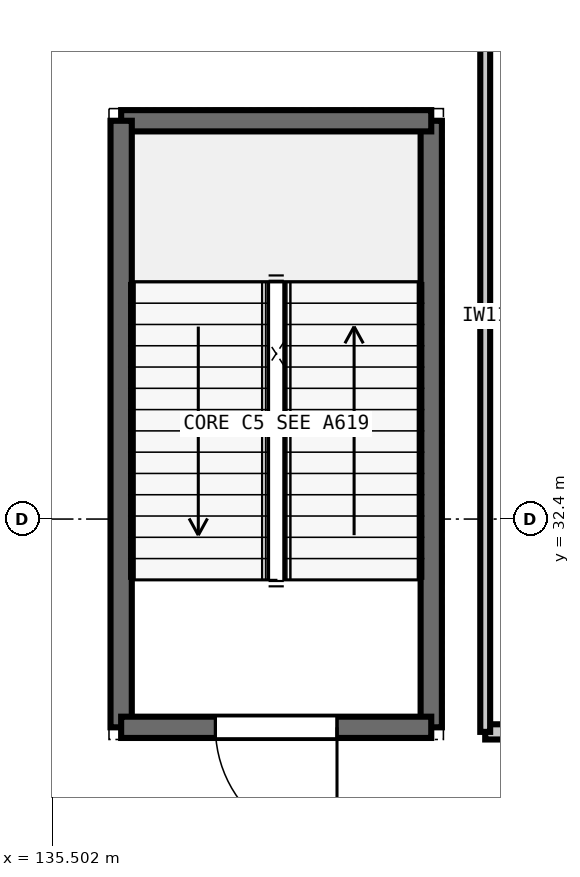
"""IFC4 building model, lengths in metres.
Left out: names, types, materials, properties, quantities, classifications, styles, units other than length and angle.
Written with IfcOpenShell. Run it as: python <this file> out.ifc"""

import sys

from ifc_helpers import new_model, si_unit, direction, frame, frame_2d, origin, place, context, subcontext, project, spatial, rectangle, extrude, element, fill, save


model = new_model("IFC4")
c1 = context("Model", 3, precision=1e-05, world=origin(), true_north=direction((0.0, 1.0)))
c2 = subcontext(c1, "Body", "Model", "MODEL_VIEW")
j1 = project(units=[si_unit("LENGTHUNIT", "METRE"), si_unit("PLANEANGLEUNIT", "RADIAN")], contexts=[c1])
p1 = place(None, origin())
s1 = spatial("IfcSite", under=j1, at=p1, CompositionType="ELEMENT")
p2 = place(p1, origin())
s2 = spatial("IfcBuilding", under=s1, at=p2, CompositionType="ELEMENT")
p3 = place(p2, frame((0.0, 0.0, 5.4)))
s3 = spatial("IfcBuildingStorey", under=s2, at=p3, CompositionType="ELEMENT", Elevation=5.4)
p4 = place(p3, frame((140.49, 29.66, 0.0), z_axis=(0.0, 0.0, 1.0), x_axis=(0.0, 1.0, 0.0)))
e1 = element("IfcWall", 1, at=p4, inside=s3, PredefinedType="SHEAR", context=c2, shape_type="SweptSolid", body=[
    extrude(rectangle(XDim=7.98, YDim=0.28, at=frame_2d((3.99, 0.0))), origin(), (0.0, 0.0, 1.0), 5.4),
])
p5 = place(p3, frame((140.49, 37.64, 0.0), z_axis=(0.0, 0.0, 1.0), x_axis=(-1.0, 0.0, 0.0)))
e2 = element("IfcWall", 2, at=p5, inside=s3, PredefinedType="SHEAR", context=c2, shape_type="SweptSolid", body=[
    extrude(rectangle(XDim=4.08, YDim=0.28, at=frame_2d((2.04, 0.0))), origin(), (0.0, 0.0, 1.0), 5.4),
])
p6 = place(p3, frame((136.41, 37.64, 0.0), z_axis=(0.0, 0.0, 1.0), x_axis=(0.0, -1.0, 0.0)))
e3 = element("IfcWall", 3, at=p6, inside=s3, PredefinedType="SHEAR", context=c2, shape_type="SweptSolid", body=[
    extrude(rectangle(XDim=7.98, YDim=0.28, at=frame_2d((3.99, 0.0))), origin(), (0.0, 0.0, 1.0), 5.4),
])
p7 = place(p3, frame((136.41, 29.66, 0.0), z_axis=(0.0, 0.0, 1.0), x_axis=(1.0, 0.0, 0.0)))
e4 = element("IfcWall", 4, at=p7, inside=s3, PredefinedType="SHEAR", context=c2, shape_type="SweptSolid", body=[
    extrude(rectangle(XDim=4.08, YDim=0.28, at=frame_2d((2.04, 0.0))), origin(), (0.0, 0.0, 1.0), 5.4),
])
p8 = place(p7, frame((1.24, 0.0, 0.0)))
e5 = element("IfcOpeningElement", 5, at=p8, cuts=e4, PredefinedType="OPENING", context=c2, shape_type="SweptSolid", body=[
    extrude(rectangle(XDim=1.6, YDim=2.25, at=frame_2d((0.8, 1.125))), frame((0.0, 0.15, 0.0), z_axis=(0.0, -1.0, 0.0), x_axis=(1.0, 0.0, 0.0)), (0.0, 0.0, 1.0), 0.3),
])
p9 = place(p3, frame((141.2, 29.6, 0.0), z_axis=(0.0, 0.0, 1.0), x_axis=(1.0, 0.0, 0.0)))
e6 = element("IfcWall", 6, at=p9, inside=s3, PredefinedType="PARTITIONING", context=c2, shape_type="SweptSolid", body=[
    extrude(rectangle(XDim=10.0, YDim=0.2, at=frame_2d((5.0, 0.0))), origin(), (0.0, 0.0, 1.0), 5.05),
])
p10 = place(p9, frame((4.375, 0.0, 0.0)))
e7 = element("IfcOpeningElement", 7, at=p10, cuts=e6, PredefinedType="OPENING", context=c2, shape_type="SweptSolid", body=[
    extrude(rectangle(XDim=1.25, YDim=2.15, at=frame_2d((0.625, 1.075))), frame((0.0, 0.11, 0.0), z_axis=(0.0, -1.0, 0.0), x_axis=(1.0, 0.0, 0.0)), (0.0, 0.0, 1.0), 0.22),
])
p11 = place(p3, frame((141.2, 29.6, 0.0), z_axis=(0.0, 0.0, 1.0), x_axis=(0.0, 1.0, 0.0)))
e8 = element("IfcWall", 8, at=p11, inside=s3, PredefinedType="PARTITIONING", context=c2, shape_type="SweptSolid", body=[
    extrude(rectangle(XDim=10.94, YDim=0.13, at=frame_2d((5.47, 0.0))), origin(), (0.0, 0.0, 1.0), 5.05),
])
p12 = place(p8, frame((1.6, 0.0, 0.0), z_axis=(0.0, 0.0, 1.0), x_axis=(-1.0, 0.0, 0.0)))
e9 = element("IfcDoor", 9, at=p12, inside=s3, OperationType="SINGLE_SWING_LEFT", PredefinedType="DOOR", context=c2, shape_type="SweptSolid", body=[
    extrude(rectangle(XDim=1.6, YDim=2.25, at=frame_2d((0.8, 1.125))), frame((0.0, 0.025, 0.0), z_axis=(0.0, -1.0, 0.0), x_axis=(1.0, 0.0, 0.0)), (0.0, 0.0, 1.0), 0.05),
])
fill(e5, e9)
save(model, sys.argv[1])
